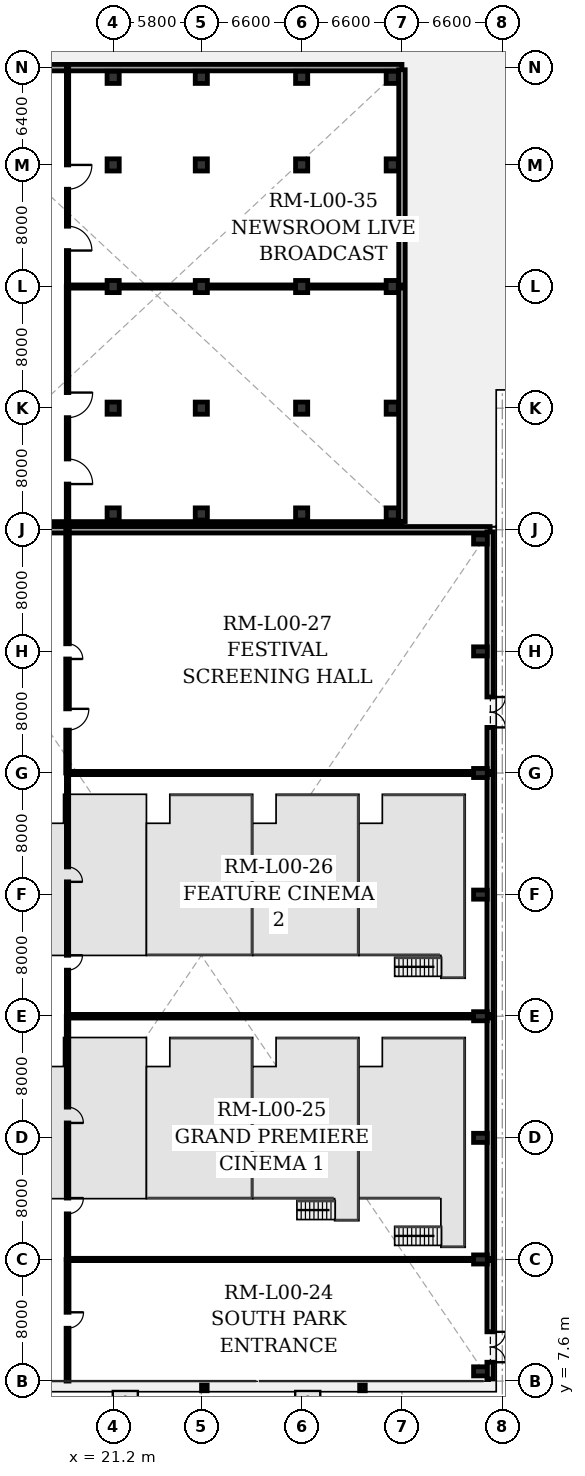
"""IFC4 building model, lengths in metres.
Left out: names, types, materials, properties, quantities, classifications, styles, units other than length and angle.
Written with IfcOpenShell. Run it as: python <this file> out.ifc"""

import sys

from ifc_helpers import new_model, si_unit, direction, frame, frame_2d, origin, origin_2d, place, context, subcontext, project, spatial, rectangle, i_section, extrude, element, fill, save


model = new_model("IFC4")
c1 = context("Model", 3, precision=1e-05, world=origin(), true_north=direction((0.0, 1.0)))
c2 = subcontext(c1, "Body", "Model", "MODEL_VIEW")
j1 = project(units=[si_unit("LENGTHUNIT", "METRE"), si_unit("PLANEANGLEUNIT", "RADIAN")], contexts=[c1])
p1 = place(None, origin())
s1 = spatial("IfcSite", under=j1, at=p1, CompositionType="ELEMENT")
p2 = place(p1, origin())
s2 = spatial("IfcBuilding", under=s1, at=p2, CompositionType="ELEMENT")
p3 = place(p2, origin())
s3 = spatial("IfcBuildingStorey", under=s2, at=p3, CompositionType="ELEMENT", Elevation=0.0)
for number, where, z_axis, x_axis in (
    (1, (45.36, 8.24, 0.0), (0.0, 0.0, 1.0), (1.0, 0.0, 0.0)),
    (2, (45.36, 15.6, 0.0), (0.0, 0.0, 1.0), (1.0, 0.0, 0.0)),
    (3, (45.36, 23.6, 0.0), (0.0, 0.0, 1.0), (1.0, 0.0, 0.0)),
    (4, (45.36, 31.6, 0.0), (0.0, 0.0, 1.0), (1.0, 0.0, 0.0)),
    (5, (45.36, 39.6, 0.0), (0.0, 0.0, 1.0), (1.0, 0.0, 0.0)),
    (6, (45.36, 47.6, 0.0), (0.0, 0.0, 1.0), (1.0, 0.0, 0.0)),
    (7, (45.36, 55.6, 0.0), (0.0, 0.0, 1.0), (1.0, 0.0, 0.0)),
    (8, (45.36, 62.96, 0.0), (0.0, 0.0, 1.0), (1.0, 0.0, 0.0)),
):
    element("IfcColumn", number, at=place(p3, frame(where, z_axis=z_axis, x_axis=x_axis)), inside=s3, PredefinedType="COLUMN", context=c2, shape_type="SweptSolid", body=[
        extrude(rectangle(XDim=0.6, YDim=0.9, at=origin_2d()), origin(), (0.0, 0.0, 1.0), 5.4),
    ])
for number, where, z_axis, x_axis in (
    (9, (21.2, 64.64, 0.0), (0.0, 0.0, 1.0), (1.0, 0.0, 0.0)),
    (10, (21.2, 71.6, 0.0), (0.0, 0.0, 1.0), (1.0, 0.0, 0.0)),
    (11, (21.2, 79.6, 0.0), (0.0, 0.0, 1.0), (1.0, 0.0, 0.0)),
    (12, (21.2, 87.6, 0.0), (0.0, 0.0, 1.0), (1.0, 0.0, 0.0)),
    (13, (21.2, 93.36, 0.0), (0.0, 0.0, 1.0), (1.0, 0.0, 0.0)),
    (14, (27.0, 64.64, 0.0), (0.0, 0.0, 1.0), (1.0, 0.0, 0.0)),
    (15, (27.0, 71.6, 0.0), (0.0, 0.0, 1.0), (1.0, 0.0, 0.0)),
    (16, (27.0, 79.6, 0.0), (0.0, 0.0, 1.0), (1.0, 0.0, 0.0)),
    (17, (27.0, 87.6, 0.0), (0.0, 0.0, 1.0), (1.0, 0.0, 0.0)),
    (18, (27.0, 93.36, 0.0), (0.0, 0.0, 1.0), (1.0, 0.0, 0.0)),
    (19, (33.6, 64.64, 0.0), (0.0, 0.0, 1.0), (1.0, 0.0, 0.0)),
    (20, (33.6, 71.6, 0.0), (0.0, 0.0, 1.0), (1.0, 0.0, 0.0)),
    (21, (33.6, 79.6, 0.0), (0.0, 0.0, 1.0), (1.0, 0.0, 0.0)),
    (22, (33.6, 87.6, 0.0), (0.0, 0.0, 1.0), (1.0, 0.0, 0.0)),
    (23, (33.6, 93.36, 0.0), (0.0, 0.0, 1.0), (1.0, 0.0, 0.0)),
    (24, (39.56, 64.64, 0.0), (0.0, 0.0, 1.0), (1.0, 0.0, 0.0)),
    (25, (39.56, 71.6, 0.0), (0.0, 0.0, 1.0), (1.0, 0.0, 0.0)),
    (26, (39.56, 79.6, 0.0), (0.0, 0.0, 1.0), (1.0, 0.0, 0.0)),
    (27, (39.56, 87.6, 0.0), (0.0, 0.0, 1.0), (1.0, 0.0, 0.0)),
    (28, (39.56, 93.36, 0.0), (0.0, 0.0, 1.0), (1.0, 0.0, 0.0)),
):
    element("IfcColumn", number, at=place(p3, frame(where, z_axis=z_axis, x_axis=x_axis)), inside=s3, PredefinedType="COLUMN", context=c2, shape_type="SweptSolid", body=[
        extrude(rectangle(XDim=0.8, YDim=0.8, at=origin_2d()), origin(), (0.0, 0.0, 1.0), 5.4),
    ])
for number, where, z_axis, x_axis in (
    (29, (27.2, 7.15, 0.0), (0.0, 0.0, 1.0), (1.0, 0.0, 0.0)),
    (30, (37.6, 7.15, 0.0), (0.0, 0.0, 1.0), (1.0, 0.0, 0.0)),
):
    element("IfcColumn", number, at=place(p3, frame(where, z_axis=z_axis, x_axis=x_axis)), inside=s3, PredefinedType="COLUMN", context=c2, shape_type="SweptSolid", body=[
        extrude(i_section(OverallWidth=0.373, OverallDepth=0.368, WebThickness=0.014, FlangeThickness=0.024, at=origin_2d()), origin(), (0.0, 0.0, 1.0), 5.4),
    ])
p4 = place(p3, frame((8.0, 63.6, 0.0), z_axis=(0.0, 0.0, 1.0), x_axis=(1.0, 0.0, 0.0)))
e31 = element("IfcWall", 31, at=p4, inside=s3, PredefinedType="SOLIDWALL", context=c2, shape_type="SweptSolid", body=[
    extrude(rectangle(XDim=38.0, YDim=0.425, at=frame_2d((19.0, 0.0))), origin(), (0.0, 0.0, 1.0), 5.14),
])
p5 = place(p3, frame((46.0, 63.46, 0.0), z_axis=(0.0, 0.0, 1.0), x_axis=(0.0, -1.0, 0.0)))
e32 = element("IfcWall", 32, at=p5, inside=s3, PredefinedType="SOLIDWALL", context=c2, shape_type="SweptSolid", body=[
    extrude(rectangle(XDim=55.72, YDim=0.425, at=frame_2d((27.86, 0.0))), origin(), (0.0, 0.0, 1.0), 5.14),
])
p6 = place(p5, frame((52.62, 0.0, 0.0)))
e33 = element("IfcOpeningElement", 33, at=p6, cuts=e32, PredefinedType="OPENING", context=c2, shape_type="SweptSolid", body=[
    extrude(rectangle(XDim=2.0, YDim=2.5, at=frame_2d((1.0, 1.25))), frame((0.0, 0.222, 0.0), z_axis=(0.0, -1.0, 0.0), x_axis=(1.0, 0.0, 0.0)), (0.0, 0.0, 1.0), 0.445),
])
p7 = place(p5, frame((10.86, 0.0, 0.0)))
e34 = element("IfcOpeningElement", 34, at=p7, cuts=e32, PredefinedType="OPENING", context=c2, shape_type="SweptSolid", body=[
    extrude(rectangle(XDim=2.0, YDim=2.5, at=frame_2d((1.0, 1.25))), frame((0.0, 0.222, 0.0), z_axis=(0.0, -1.0, 0.0), x_axis=(1.0, 0.0, 0.0)), (0.0, 0.0, 1.0), 0.445),
])
p8 = place(p3, frame((8.0, 94.0, 0.0), z_axis=(0.0, 0.0, 1.0), x_axis=(1.0, 0.0, 0.0)))
e35 = element("IfcWall", 35, at=p8, inside=s3, PredefinedType="SOLIDWALL", context=c2, shape_type="SweptSolid", body=[
    extrude(rectangle(XDim=32.2, YDim=0.425, at=frame_2d((16.1, 0.0))), origin(), (0.0, 0.0, 1.0), 5.12),
])
p9 = place(p3, frame((40.2, 93.86, 0.0), z_axis=(0.0, 0.0, 1.0), x_axis=(0.0, -1.0, 0.0)))
e36 = element("IfcWall", 36, at=p9, inside=s3, PredefinedType="SOLIDWALL", context=c2, shape_type="SweptSolid", body=[
    extrude(rectangle(XDim=29.72, YDim=0.425, at=frame_2d((14.86, 0.0))), origin(), (0.0, 0.0, 1.0), 5.12),
])
p10 = place(p3, frame((40.2, 64.0, 0.0), z_axis=(0.0, 0.0, 1.0), x_axis=(-1.0, 0.0, 0.0)))
e37 = element("IfcWall", 37, at=p10, inside=s3, PredefinedType="SOLIDWALL", context=c2, shape_type="SweptSolid", body=[
    extrude(rectangle(XDim=32.2, YDim=0.275, at=frame_2d((16.1, 0.0))), origin(), (0.0, 0.0, 1.0), 5.12),
])
p11 = place(p3, frame((18.2, 15.6, 0.0), z_axis=(0.0, 0.0, 1.0), x_axis=(0.0, -1.0, 0.0)))
e38 = element("IfcWall", 38, at=p11, inside=s3, PredefinedType="PARTITIONING", context=c2, shape_type="SweptSolid", body=[
    extrude(rectangle(XDim=8.0, YDim=0.19, at=frame_2d((4.0, 0.0))), origin(), (0.0, 0.0, 1.0), 5.14),
])
p12 = place(p11, frame((3.475, 0.0, 0.0)))
e39 = element("IfcOpeningElement", 39, at=p12, cuts=e38, PredefinedType="OPENING", context=c2, shape_type="SweptSolid", body=[
    extrude(rectangle(XDim=1.05, YDim=2.15, at=frame_2d((0.525, 1.075))), frame((0.0, 0.105, 0.0), z_axis=(0.0, -1.0, 0.0), x_axis=(1.0, 0.0, 0.0)), (0.0, 0.0, 1.0), 0.21),
])
p13 = place(p3, frame((18.2, 31.6, 0.0), z_axis=(0.0, 0.0, 1.0), x_axis=(0.0, -1.0, 0.0)))
e40 = element("IfcWall", 40, at=p13, inside=s3, PredefinedType="PARTITIONING", context=c2, shape_type="SweptSolid", body=[
    extrude(rectangle(XDim=16.0, YDim=0.165, at=frame_2d((8.0, 0.0))), origin(), (0.0, 0.0, 1.0), 5.14),
])
p14 = place(p13, frame((5.98, 0.0, 0.0)))
e41 = element("IfcOpeningElement", 41, at=p14, cuts=e40, PredefinedType="OPENING", context=c2, shape_type="SweptSolid", body=[
    extrude(rectangle(XDim=1.04, YDim=2.2, at=frame_2d((0.52, 1.1))), frame((0.0, 0.093, 0.0), z_axis=(0.0, -1.0, 0.0), x_axis=(1.0, 0.0, 0.0)), (0.0, 0.0, 1.0), 0.185),
])
p15 = place(p13, frame((11.96, 0.0, 0.0)))
e42 = element("IfcOpeningElement", 42, at=p15, cuts=e40, PredefinedType="OPENING", context=c2, shape_type="SweptSolid", body=[
    extrude(rectangle(XDim=1.04, YDim=2.2, at=frame_2d((0.52, 1.1))), frame((0.0, 0.093, 0.0), z_axis=(0.0, -1.0, 0.0), x_axis=(1.0, 0.0, 0.0)), (0.0, 0.0, 1.0), 0.185),
])
p16 = place(p3, frame((18.2, 47.6, 0.0), z_axis=(0.0, 0.0, 1.0), x_axis=(0.0, -1.0, 0.0)))
e43 = element("IfcWall", 43, at=p16, inside=s3, PredefinedType="PARTITIONING", context=c2, shape_type="SweptSolid", body=[
    extrude(rectangle(XDim=16.0, YDim=0.15, at=frame_2d((8.0, 0.0))), origin(), (0.0, 0.0, 1.0), 5.14),
])
p17 = place(p16, frame((6.18, 0.0, 0.0)))
e44 = element("IfcOpeningElement", 44, at=p17, cuts=e43, PredefinedType="OPENING", context=c2, shape_type="SweptSolid", body=[
    extrude(rectangle(XDim=0.98, YDim=2.1, at=frame_2d((0.49, 1.05))), frame((0.0, 0.085, 0.0), z_axis=(0.0, -1.0, 0.0), x_axis=(1.0, 0.0, 0.0)), (0.0, 0.0, 1.0), 0.17),
])
p18 = place(p16, frame((11.99, 0.0, 0.0)))
e45 = element("IfcOpeningElement", 45, at=p18, cuts=e43, PredefinedType="OPENING", context=c2, shape_type="SweptSolid", body=[
    extrude(rectangle(XDim=0.98, YDim=2.1, at=frame_2d((0.49, 1.05))), frame((0.0, 0.085, 0.0), z_axis=(0.0, -1.0, 0.0), x_axis=(1.0, 0.0, 0.0)), (0.0, 0.0, 1.0), 0.17),
])
p19 = place(p3, frame((18.2, 63.6, 0.0), z_axis=(0.0, 0.0, 1.0), x_axis=(0.0, -1.0, 0.0)))
e46 = element("IfcWall", 46, at=p19, inside=s3, PredefinedType="PARTITIONING", context=c2, shape_type="SweptSolid", body=[
    extrude(rectangle(XDim=16.0, YDim=0.24, at=frame_2d((8.0, 0.0))), origin(), (0.0, 0.0, 1.0), 5.14),
])
p20 = place(p19, frame((7.5, 0.0, 0.0)))
e47 = element("IfcOpeningElement", 47, at=p20, cuts=e46, PredefinedType="OPENING", context=c2, shape_type="SweptSolid", body=[
    extrude(rectangle(XDim=1.0, YDim=2.1, at=frame_2d((0.5, 1.05))), frame((0.0, 0.13, 0.0), z_axis=(0.0, -1.0, 0.0), x_axis=(1.0, 0.0, 0.0)), (0.0, 0.0, 1.0), 0.26),
])
p21 = place(p19, frame((11.78, 0.0, 0.0)))
e48 = element("IfcOpeningElement", 48, at=p21, cuts=e46, PredefinedType="OPENING", context=c2, shape_type="SweptSolid", body=[
    extrude(rectangle(XDim=1.4, YDim=2.25, at=frame_2d((0.7, 1.125))), frame((0.0, 0.13, 0.0), z_axis=(0.0, -1.0, 0.0), x_axis=(1.0, 0.0, 0.0)), (0.0, 0.0, 1.0), 0.26),
])
p22 = place(p3, frame((18.2, 15.6, 0.0), z_axis=(0.0, 0.0, 1.0), x_axis=(1.0, 0.0, 0.0)))
e49 = element("IfcWall", 49, at=p22, inside=s3, PredefinedType="PARTITIONING", context=c2, shape_type="SweptSolid", body=[
    extrude(rectangle(XDim=27.8, YDim=0.15, at=frame_2d((13.9, 0.0))), origin(), (0.0, 0.0, 1.0), 4.29),
])
p23 = place(p3, frame((18.2, 31.6, 0.0), z_axis=(0.0, 0.0, 1.0), x_axis=(1.0, 0.0, 0.0)))
e50 = element("IfcWall", 50, at=p23, inside=s3, PredefinedType="PARTITIONING", context=c2, shape_type="SweptSolid", body=[
    extrude(rectangle(XDim=27.8, YDim=0.24, at=frame_2d((13.9, 0.0))), origin(), (0.0, 0.0, 1.0), 4.29),
])
p24 = place(p3, frame((18.2, 47.6, 0.0), z_axis=(0.0, 0.0, 1.0), x_axis=(1.0, 0.0, 0.0)))
e51 = element("IfcWall", 51, at=p24, inside=s3, PredefinedType="PARTITIONING", context=c2, shape_type="SweptSolid", body=[
    extrude(rectangle(XDim=27.8, YDim=0.21, at=frame_2d((13.9, 0.0))), origin(), (0.0, 0.0, 1.0), 4.29),
])
p25 = place(p3, frame((18.2, 79.6, 0.0), z_axis=(0.0, 0.0, 1.0), x_axis=(0.0, -1.0, 0.0)))
e52 = element("IfcWall", 52, at=p25, inside=s3, PredefinedType="PARTITIONING", context=c2, shape_type="SweptSolid", body=[
    extrude(rectangle(XDim=15.6, YDim=0.165, at=frame_2d((7.8, 0.0))), origin(), (0.0, 0.0, 1.0), 5.12),
])
p26 = place(p25, frame((6.975, 0.0, 0.0)))
e53 = element("IfcOpeningElement", 53, at=p26, cuts=e52, PredefinedType="OPENING", context=c2, shape_type="SweptSolid", body=[
    extrude(rectangle(XDim=1.65, YDim=2.3, at=frame_2d((0.825, 1.15))), frame((0.0, 0.093, 0.0), z_axis=(0.0, -1.0, 0.0), x_axis=(1.0, 0.0, 0.0)), (0.0, 0.0, 1.0), 0.185),
])
p27 = place(p25, frame((11.343, 0.0, 0.0)))
e54 = element("IfcOpeningElement", 54, at=p27, cuts=e52, PredefinedType="OPENING", context=c2, shape_type="SweptSolid", body=[
    extrude(rectangle(XDim=1.65, YDim=2.3, at=frame_2d((0.825, 1.15))), frame((0.0, 0.093, 0.0), z_axis=(0.0, -1.0, 0.0), x_axis=(1.0, 0.0, 0.0)), (0.0, 0.0, 1.0), 0.185),
])
p28 = place(p3, frame((18.2, 94.0, 0.0), z_axis=(0.0, 0.0, 1.0), x_axis=(0.0, -1.0, 0.0)))
e55 = element("IfcWall", 55, at=p28, inside=s3, PredefinedType="PARTITIONING", context=c2, shape_type="SweptSolid", body=[
    extrude(rectangle(XDim=14.4, YDim=0.15, at=frame_2d((7.2, 0.0))), origin(), (0.0, 0.0, 1.0), 5.12),
])
p29 = place(p28, frame((6.4, 0.0, 0.0)))
e56 = element("IfcOpeningElement", 56, at=p29, cuts=e55, PredefinedType="OPENING", context=c2, shape_type="SweptSolid", body=[
    extrude(rectangle(XDim=1.6, YDim=2.3, at=frame_2d((0.8, 1.15))), frame((0.0, 0.085, 0.0), z_axis=(0.0, -1.0, 0.0), x_axis=(1.0, 0.0, 0.0)), (0.0, 0.0, 1.0), 0.17),
])
p30 = place(p28, frame((10.432, 0.0, 0.0)))
e57 = element("IfcOpeningElement", 57, at=p30, cuts=e55, PredefinedType="OPENING", context=c2, shape_type="SweptSolid", body=[
    extrude(rectangle(XDim=1.6, YDim=2.3, at=frame_2d((0.8, 1.15))), frame((0.0, 0.085, 0.0), z_axis=(0.0, -1.0, 0.0), x_axis=(1.0, 0.0, 0.0)), (0.0, 0.0, 1.0), 0.17),
])
p31 = place(p3, frame((18.2, 79.6, 0.0), z_axis=(0.0, 0.0, 1.0), x_axis=(1.0, 0.0, 0.0)))
e58 = element("IfcWall", 58, at=p31, inside=s3, PredefinedType="PARTITIONING", context=c2, shape_type="SweptSolid", body=[
    extrude(rectangle(XDim=22.0, YDim=0.21, at=frame_2d((11.0, 0.0))), origin(), (0.0, 0.0, 1.0), 4.47),
])
p32 = place(p6, origin())
e59 = element("IfcDoor", 59, at=p32, inside=s3, OperationType="DOUBLE_SWING_LEFT", PredefinedType="DOOR", context=c2, shape_type="SweptSolid", body=[
    extrude(rectangle(XDim=2.0, YDim=2.5, at=frame_2d((1.0, 1.25))), frame((0.0, 0.025, 0.0), z_axis=(0.0, -1.0, 0.0), x_axis=(1.0, 0.0, 0.0)), (0.0, 0.0, 1.0), 0.05),
])
fill(e33, e59)
p33 = place(p7, origin())
e60 = element("IfcDoor", 60, at=p33, inside=s3, OperationType="DOUBLE_SWING_LEFT", PredefinedType="DOOR", context=c2, shape_type="SweptSolid", body=[
    extrude(rectangle(XDim=2.0, YDim=2.5, at=frame_2d((1.0, 1.25))), frame((0.0, 0.025, 0.0), z_axis=(0.0, -1.0, 0.0), x_axis=(1.0, 0.0, 0.0)), (0.0, 0.0, 1.0), 0.05),
])
fill(e34, e60)
p34 = place(p12, origin())
e61 = element("IfcDoor", 61, at=p34, inside=s3, OperationType="SINGLE_SWING_LEFT", PredefinedType="DOOR", context=c2, shape_type="SweptSolid", body=[
    extrude(rectangle(XDim=1.05, YDim=2.15, at=frame_2d((0.525, 1.075))), frame((0.0, 0.025, 0.0), z_axis=(0.0, -1.0, 0.0), x_axis=(1.0, 0.0, 0.0)), (0.0, 0.0, 1.0), 0.05),
])
fill(e39, e61)
p35 = place(p14, origin())
e62 = element("IfcDoor", 62, at=p35, inside=s3, OperationType="SINGLE_SWING_RIGHT", PredefinedType="DOOR", context=c2, shape_type="SweptSolid", body=[
    extrude(rectangle(XDim=1.04, YDim=2.2, at=frame_2d((0.52, 1.1))), frame((0.0, 0.025, 0.0), z_axis=(0.0, -1.0, 0.0), x_axis=(1.0, 0.0, 0.0)), (0.0, 0.0, 1.0), 0.05),
])
fill(e41, e62)
p36 = place(p15, origin())
e63 = element("IfcDoor", 63, at=p36, inside=s3, OperationType="SINGLE_SWING_LEFT", PredefinedType="DOOR", context=c2, shape_type="SweptSolid", body=[
    extrude(rectangle(XDim=1.04, YDim=2.2, at=frame_2d((0.52, 1.1))), frame((0.0, 0.025, 0.0), z_axis=(0.0, -1.0, 0.0), x_axis=(1.0, 0.0, 0.0)), (0.0, 0.0, 1.0), 0.05),
])
fill(e42, e63)
p37 = place(p17, origin())
e64 = element("IfcDoor", 64, at=p37, inside=s3, OperationType="SINGLE_SWING_RIGHT", PredefinedType="DOOR", context=c2, shape_type="SweptSolid", body=[
    extrude(rectangle(XDim=0.98, YDim=2.1, at=frame_2d((0.49, 1.05))), frame((0.0, 0.025, 0.0), z_axis=(0.0, -1.0, 0.0), x_axis=(1.0, 0.0, 0.0)), (0.0, 0.0, 1.0), 0.05),
])
fill(e44, e64)
p38 = place(p18, origin())
e65 = element("IfcDoor", 65, at=p38, inside=s3, OperationType="SINGLE_SWING_LEFT", PredefinedType="DOOR", context=c2, shape_type="SweptSolid", body=[
    extrude(rectangle(XDim=0.98, YDim=2.1, at=frame_2d((0.49, 1.05))), frame((0.0, 0.025, 0.0), z_axis=(0.0, -1.0, 0.0), x_axis=(1.0, 0.0, 0.0)), (0.0, 0.0, 1.0), 0.05),
])
fill(e45, e65)
p39 = place(p20, origin())
e66 = element("IfcDoor", 66, at=p39, inside=s3, OperationType="SINGLE_SWING_RIGHT", PredefinedType="DOOR", context=c2, shape_type="SweptSolid", body=[
    extrude(rectangle(XDim=1.0, YDim=2.1, at=frame_2d((0.5, 1.05))), frame((0.0, 0.025, 0.0), z_axis=(0.0, -1.0, 0.0), x_axis=(1.0, 0.0, 0.0)), (0.0, 0.0, 1.0), 0.05),
])
fill(e47, e66)
p40 = place(p21, origin())
e67 = element("IfcDoor", 67, at=p40, inside=s3, OperationType="SINGLE_SWING_LEFT", PredefinedType="DOOR", context=c2, shape_type="SweptSolid", body=[
    extrude(rectangle(XDim=1.4, YDim=2.25, at=frame_2d((0.7, 1.125))), frame((0.0, 0.025, 0.0), z_axis=(0.0, -1.0, 0.0), x_axis=(1.0, 0.0, 0.0)), (0.0, 0.0, 1.0), 0.05),
])
fill(e48, e67)
p41 = place(p26, origin())
e68 = element("IfcDoor", 68, at=p41, inside=s3, OperationType="SINGLE_SWING_LEFT", PredefinedType="DOOR", context=c2, shape_type="SweptSolid", body=[
    extrude(rectangle(XDim=1.65, YDim=2.3, at=frame_2d((0.825, 1.15))), frame((0.0, 0.025, 0.0), z_axis=(0.0, -1.0, 0.0), x_axis=(1.0, 0.0, 0.0)), (0.0, 0.0, 1.0), 0.05),
])
fill(e53, e68)
p42 = place(p27, origin())
e69 = element("IfcDoor", 69, at=p42, inside=s3, OperationType="SINGLE_SWING_RIGHT", PredefinedType="DOOR", context=c2, shape_type="SweptSolid", body=[
    extrude(rectangle(XDim=1.65, YDim=2.3, at=frame_2d((0.825, 1.15))), frame((0.0, 0.025, 0.0), z_axis=(0.0, -1.0, 0.0), x_axis=(1.0, 0.0, 0.0)), (0.0, 0.0, 1.0), 0.05),
])
fill(e54, e69)
p43 = place(p29, origin())
e70 = element("IfcDoor", 70, at=p43, inside=s3, OperationType="SINGLE_SWING_LEFT", PredefinedType="DOOR", context=c2, shape_type="SweptSolid", body=[
    extrude(rectangle(XDim=1.6, YDim=2.3, at=frame_2d((0.8, 1.15))), frame((0.0, 0.025, 0.0), z_axis=(0.0, -1.0, 0.0), x_axis=(1.0, 0.0, 0.0)), (0.0, 0.0, 1.0), 0.05),
])
fill(e56, e70)
p44 = place(p30, origin())
e71 = element("IfcDoor", 71, at=p44, inside=s3, OperationType="SINGLE_SWING_RIGHT", PredefinedType="DOOR", context=c2, shape_type="SweptSolid", body=[
    extrude(rectangle(XDim=1.6, YDim=2.3, at=frame_2d((0.8, 1.15))), frame((0.0, 0.025, 0.0), z_axis=(0.0, -1.0, 0.0), x_axis=(1.0, 0.0, 0.0)), (0.0, 0.0, 1.0), 0.05),
])
fill(e57, e71)
save(model, sys.argv[1])
